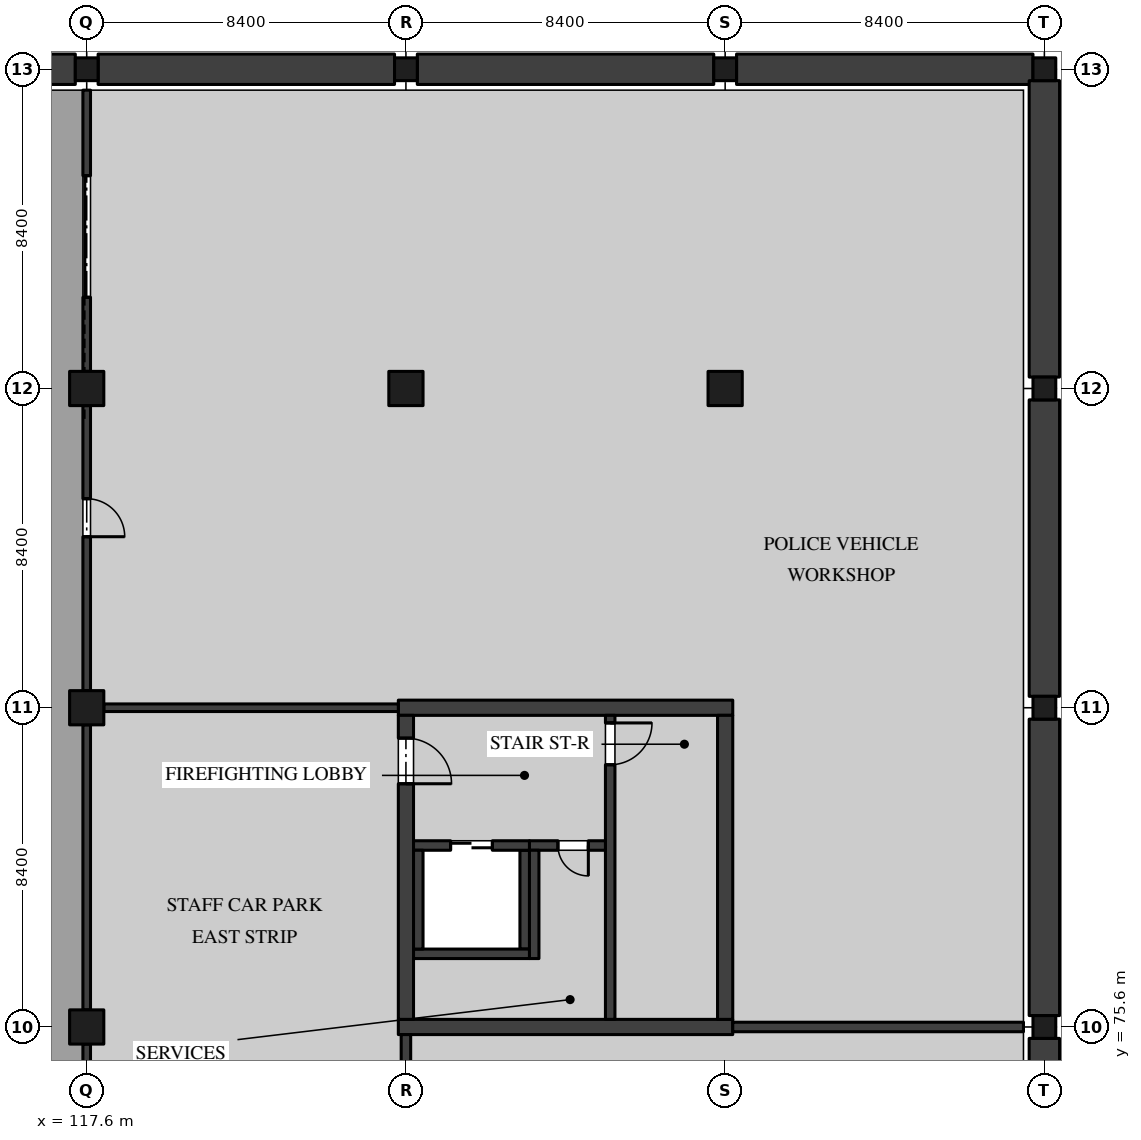
"""IFC4 building model, lengths in metres.
Left out: names, types, materials, properties, quantities, classifications, styles, units other than length and angle.
Written with IfcOpenShell. Run it as: python <this file> out.ifc"""

import sys

from ifc_helpers import new_model, si_unit, direction, frame, frame_2d, origin, origin_2d, place, context, subcontext, project, spatial, rectangle, extrude, element, fill, save


model = new_model("IFC4")
c1 = context("Model", 3, precision=1e-05, world=origin(), true_north=direction((0.0, 1.0)))
c2 = subcontext(c1, "Body", "Model", "MODEL_VIEW")
j1 = project(units=[si_unit("LENGTHUNIT", "METRE"), si_unit("PLANEANGLEUNIT", "RADIAN")], contexts=[c1])
p1 = place(None, origin())
s1 = spatial("IfcSite", under=j1, at=p1, CompositionType="ELEMENT")
p2 = place(p1, origin())
s2 = spatial("IfcBuilding", under=s1, at=p2, CompositionType="ELEMENT")
p3 = place(p2, frame((0.0, 0.0, -4.5)))
s3 = spatial("IfcBuildingStorey", under=s2, at=p3, CompositionType="ELEMENT", Elevation=-4.5)
for number, where, z_axis, x_axis in (
    (1, (117.6, 75.6, 0.0), (0.0, 0.0, 1.0), (1.0, 0.0, 0.0)),
    (2, (117.6, 84.0, 0.0), (0.0, 0.0, 1.0), (1.0, 0.0, 0.0)),
    (3, (117.6, 92.4, 0.0), (0.0, 0.0, 1.0), (1.0, 0.0, 0.0)),
):
    element("IfcColumn", number, at=place(p3, frame(where, z_axis=z_axis, x_axis=x_axis)), inside=s3, PredefinedType="COLUMN", context=c2, shape_type="SweptSolid", body=[
        extrude(rectangle(XDim=0.9, YDim=0.9, at=origin_2d()), origin(), (0.0, 0.0, 1.0), 4.05),
    ])
p4 = place(p3, frame((117.6, 100.8, 0.0), z_axis=(0.0, 0.0, 1.0), x_axis=(1.0, 0.0, 0.0)))
e4 = element("IfcColumn", 4, at=p4, inside=s3, PredefinedType="COLUMN", context=c2, shape_type="SweptSolid", body=[
    extrude(rectangle(XDim=0.6, YDim=0.6, at=origin_2d()), origin(), (0.0, 0.0, 1.0), 4.05),
])
p5 = place(p3, frame((126.0, 92.4, 0.0), z_axis=(0.0, 0.0, 1.0), x_axis=(1.0, 0.0, 0.0)))
e5 = element("IfcColumn", 5, at=p5, inside=s3, PredefinedType="COLUMN", context=c2, shape_type="SweptSolid", body=[
    extrude(rectangle(XDim=0.9, YDim=0.9, at=origin_2d()), origin(), (0.0, 0.0, 1.0), 4.05),
])
p6 = place(p3, frame((126.0, 100.8, 0.0), z_axis=(0.0, 0.0, 1.0), x_axis=(1.0, 0.0, 0.0)))
e6 = element("IfcColumn", 6, at=p6, inside=s3, PredefinedType="COLUMN", context=c2, shape_type="SweptSolid", body=[
    extrude(rectangle(XDim=0.6, YDim=0.6, at=origin_2d()), origin(), (0.0, 0.0, 1.0), 4.05),
])
p7 = place(p3, frame((134.4, 92.4, 0.0), z_axis=(0.0, 0.0, 1.0), x_axis=(1.0, 0.0, 0.0)))
e7 = element("IfcColumn", 7, at=p7, inside=s3, PredefinedType="COLUMN", context=c2, shape_type="SweptSolid", body=[
    extrude(rectangle(XDim=0.9, YDim=0.9, at=origin_2d()), origin(), (0.0, 0.0, 1.0), 4.05),
])
for number, where, z_axis, x_axis in (
    (8, (134.4, 100.8, 0.0), (0.0, 0.0, 1.0), (1.0, 0.0, 0.0)),
    (9, (142.8, 75.6, 0.0), (0.0, 0.0, 1.0), (1.0, 0.0, 0.0)),
    (10, (142.8, 84.0, 0.0), (0.0, 0.0, 1.0), (1.0, 0.0, 0.0)),
    (11, (142.8, 92.4, 0.0), (0.0, 0.0, 1.0), (1.0, 0.0, 0.0)),
    (12, (142.8, 100.8, 0.0), (0.0, 0.0, 1.0), (1.0, 0.0, 0.0)),
):
    element("IfcColumn", number, at=place(p3, frame(where, z_axis=z_axis, x_axis=x_axis)), inside=s3, PredefinedType="COLUMN", context=c2, shape_type="SweptSolid", body=[
        extrude(rectangle(XDim=0.6, YDim=0.6, at=origin_2d()), origin(), (0.0, 0.0, 1.0), 4.05),
    ])
for number, where, z_axis, x_axis in (
    (13, (109.5, 100.8, 0.0), (0.0, 0.0, 1.0), (1.0, 0.0, 0.0)),
    (14, (117.9, 100.8, 0.0), (0.0, 0.0, 1.0), (1.0, 0.0, 0.0)),
    (15, (126.3, 100.8, 0.0), (0.0, 0.0, 1.0), (1.0, 0.0, 0.0)),
    (16, (134.7, 100.8, 0.0), (0.0, 0.0, 1.0), (1.0, 0.0, 0.0)),
    (17, (142.8, 67.5, 0.0), (0.0, 0.0, 1.0), (0.0, 1.0, 0.0)),
    (18, (142.8, 75.9, 0.0), (0.0, 0.0, 1.0), (0.0, 1.0, 0.0)),
    (19, (142.8, 84.3, 0.0), (0.0, 0.0, 1.0), (0.0, 1.0, 0.0)),
    (20, (142.8, 92.7, 0.0), (0.0, 0.0, 1.0), (0.0, 1.0, 0.0)),
):
    element("IfcWall", number, at=place(p3, frame(where, z_axis=z_axis, x_axis=x_axis)), inside=s3, PredefinedType="SOLIDWALL", context=c2, shape_type="SweptSolid", body=[
        extrude(rectangle(XDim=7.8, YDim=0.8, at=frame_2d((3.9, 0.0))), origin(), (0.0, 0.0, 1.0), 4.05),
    ])
for number, where, z_axis, x_axis in (
    (21, (125.8, 75.6, 0.0), (0.0, 0.0, 1.0), (1.0, 0.0, 0.0)),
    (22, (125.8, 84.0, 0.0), (0.0, 0.0, 1.0), (1.0, 0.0, 0.0)),
):
    element("IfcWall", number, at=place(p3, frame(where, z_axis=z_axis, x_axis=x_axis)), inside=s3, PredefinedType="SHEAR", context=c2, shape_type="SweptSolid", body=[
        extrude(rectangle(XDim=8.8, YDim=0.4, at=frame_2d((4.4, 0.0))), origin(), (0.0, 0.0, 1.0), 4.05),
    ])
p8 = place(p3, frame((126.0, 75.8, 0.0), z_axis=(0.0, 0.0, 1.0), x_axis=(0.0, 1.0, 0.0)))
e23 = element("IfcWall", 23, at=p8, inside=s3, PredefinedType="SHEAR", context=c2, shape_type="SweptSolid", body=[
    extrude(rectangle(XDim=8.0, YDim=0.4, at=frame_2d((4.0, 0.0))), origin(), (0.0, 0.0, 1.0), 4.05),
])
p9 = place(p8, frame((6.2, 0.0, 0.0)))
e24 = element("IfcOpeningElement", 24, at=p9, cuts=e23, PredefinedType="OPENING", context=c2, shape_type="SweptSolid", body=[
    extrude(rectangle(XDim=1.2, YDim=2.1, at=frame_2d((0.6, 1.05))), frame((0.0, 0.21, 0.0), z_axis=(0.0, -1.0, 0.0), x_axis=(1.0, 0.0, 0.0)), (0.0, 0.0, 1.0), 0.42),
])
p10 = place(p3, frame((134.4, 75.8, 0.0), z_axis=(0.0, 0.0, 1.0), x_axis=(0.0, 1.0, 0.0)))
e25 = element("IfcWall", 25, at=p10, inside=s3, PredefinedType="SHEAR", context=c2, shape_type="SweptSolid", body=[
    extrude(rectangle(XDim=8.0, YDim=0.4, at=frame_2d((4.0, 0.0))), origin(), (0.0, 0.0, 1.0), 4.05),
])
p11 = place(p3, frame((131.375, 83.8, 0.0), z_axis=(0.0, 0.0, 1.0), x_axis=(0.0, -1.0, 0.0)))
e26 = element("IfcWall", 26, at=p11, inside=s3, PredefinedType="SOLIDWALL", context=c2, shape_type="SweptSolid", body=[
    extrude(rectangle(XDim=8.0, YDim=0.25, at=frame_2d((4.0, 0.0))), origin(), (0.0, 0.0, 1.0), 4.05),
])
p12 = place(p11, frame((0.2, 0.0, 0.0)))
e27 = element("IfcOpeningElement", 27, at=p12, cuts=e26, PredefinedType="OPENING", context=c2, shape_type="SweptSolid", body=[
    extrude(rectangle(XDim=1.1, YDim=2.1, at=frame_2d((0.55, 1.05))), frame((0.0, 0.135, 0.0), z_axis=(0.0, -1.0, 0.0), x_axis=(1.0, 0.0, 0.0)), (0.0, 0.0, 1.0), 0.27),
])
p13 = place(p3, frame((131.25, 80.375, 0.0), z_axis=(0.0, 0.0, 1.0), x_axis=(-1.0, 0.0, 0.0)))
e28 = element("IfcWall", 28, at=p13, inside=s3, PredefinedType="SOLIDWALL", context=c2, shape_type="SweptSolid", body=[
    extrude(rectangle(XDim=2.0, YDim=0.25, at=frame_2d((1.0, 0.0))), origin(), (0.0, 0.0, 1.0), 4.05),
])
p14 = place(p13, frame((0.45, 0.0, 0.0)))
e29 = element("IfcOpeningElement", 29, at=p14, cuts=e28, PredefinedType="OPENING", context=c2, shape_type="SweptSolid", body=[
    extrude(rectangle(XDim=0.8, YDim=2.1, at=frame_2d((0.4, 1.05))), frame((0.0, 0.135, 0.0), z_axis=(0.0, -1.0, 0.0), x_axis=(1.0, 0.0, 0.0)), (0.0, 0.0, 1.0), 0.27),
])
p15 = place(p3, frame((129.375, 80.25, 0.0), z_axis=(0.0, 0.0, 1.0), x_axis=(0.0, -1.0, 0.0)))
e30 = element("IfcWall", 30, at=p15, inside=s3, PredefinedType="SOLIDWALL", context=c2, shape_type="SweptSolid", body=[
    extrude(rectangle(XDim=2.85, YDim=0.25, at=frame_2d((1.425, 0.0))), origin(), (0.0, 0.0, 1.0), 4.05),
])
p16 = place(p3, frame((129.125, 77.65, 0.0), z_axis=(0.0, 0.0, 1.0), x_axis=(0.0, 1.0, 0.0)))
e31 = element("IfcWall", 31, at=p16, inside=s3, PredefinedType="SOLIDWALL", context=c2, shape_type="SweptSolid", body=[
    extrude(rectangle(XDim=2.6, YDim=0.25, at=frame_2d((1.3, 0.0))), origin(), (0.0, 0.0, 1.0), 4.05),
])
p17 = place(p3, frame((126.2, 80.375, 0.0), z_axis=(0.0, 0.0, 1.0), x_axis=(1.0, 0.0, 0.0)))
e32 = element("IfcWall", 32, at=p17, inside=s3, PredefinedType="SOLIDWALL", context=c2, shape_type="SweptSolid", body=[
    extrude(rectangle(XDim=3.05, YDim=0.25, at=frame_2d((1.525, 0.0))), origin(), (0.0, 0.0, 1.0), 4.05),
])
p18 = place(p17, frame((0.975, 0.0, 0.0)))
e33 = element("IfcOpeningElement", 33, at=p18, cuts=e32, PredefinedType="OPENING", context=c2, shape_type="SweptSolid", body=[
    extrude(rectangle(XDim=1.1, YDim=2.1, at=frame_2d((0.55, 1.05))), frame((0.0, 0.135, 0.0), z_axis=(0.0, -1.0, 0.0), x_axis=(1.0, 0.0, 0.0)), (0.0, 0.0, 1.0), 0.27),
])
p19 = place(p3, frame((126.2, 77.525, 0.0), z_axis=(0.0, 0.0, 1.0), x_axis=(1.0, 0.0, 0.0)))
e34 = element("IfcWall", 34, at=p19, inside=s3, PredefinedType="SOLIDWALL", context=c2, shape_type="SweptSolid", body=[
    extrude(rectangle(XDim=3.05, YDim=0.25, at=frame_2d((1.525, 0.0))), origin(), (0.0, 0.0, 1.0), 4.05),
])
p20 = place(p3, frame((126.325, 77.65, 0.0), z_axis=(0.0, 0.0, 1.0), x_axis=(0.0, 1.0, 0.0)))
e35 = element("IfcWall", 35, at=p20, inside=s3, PredefinedType="SOLIDWALL", context=c2, shape_type="SweptSolid", body=[
    extrude(rectangle(XDim=2.6, YDim=0.25, at=frame_2d((1.3, 0.0))), origin(), (0.0, 0.0, 1.0), 4.05),
])
p21 = place(p3, frame((134.6, 75.6, 0.0), z_axis=(0.0, 0.0, 1.0), x_axis=(1.0, 0.0, 0.0)))
e36 = element("IfcWall", 36, at=p21, inside=s3, PredefinedType="PARTITIONING", context=c2, shape_type="SweptSolid", body=[
    extrude(rectangle(XDim=7.65, YDim=0.25, at=frame_2d((3.825, 0.0))), origin(), (0.0, 0.0, 1.0), 4.05),
])
p22 = place(p3, frame((126.0, 67.65, 0.0), z_axis=(0.0, 0.0, 1.0), x_axis=(0.0, 1.0, 0.0)))
e37 = element("IfcWall", 37, at=p22, inside=s3, PredefinedType="PARTITIONING", context=c2, shape_type="SweptSolid", body=[
    extrude(rectangle(XDim=7.75, YDim=0.25, at=frame_2d((3.875, 0.0))), origin(), (0.0, 0.0, 1.0), 4.05),
])
p23 = place(p3, frame((117.6, 84.45, 0.0), z_axis=(0.0, 0.0, 1.0), x_axis=(0.0, 1.0, 0.0)))
e38 = element("IfcWall", 38, at=p23, inside=s3, PredefinedType="PARTITIONING", context=c2, shape_type="SweptSolid", body=[
    extrude(rectangle(XDim=7.5, YDim=0.2, at=frame_2d((3.75, 0.0))), origin(), (0.0, 0.0, 1.0), 4.05),
])
p24 = place(p23, frame((4.05, 0.0, 0.0)))
e39 = element("IfcOpeningElement", 39, at=p24, cuts=e38, PredefinedType="OPENING", context=c2, shape_type="SweptSolid", body=[
    extrude(rectangle(XDim=1.0, YDim=2.1, at=frame_2d((0.5, 1.05))), frame((0.0, 0.11, 0.0), z_axis=(0.0, -1.0, 0.0), x_axis=(1.0, 0.0, 0.0)), (0.0, 0.0, 1.0), 0.22),
])
p25 = place(p3, frame((117.6, 92.85, 0.0), z_axis=(0.0, 0.0, 1.0), x_axis=(0.0, 1.0, 0.0)))
e40 = element("IfcWall", 40, at=p25, inside=s3, PredefinedType="PARTITIONING", context=c2, shape_type="SweptSolid", body=[
    extrude(rectangle(XDim=7.4, YDim=0.2, at=frame_2d((3.7, 0.0))), origin(), (0.0, 0.0, 1.0), 4.05),
])
p26 = place(p25, frame((1.95, 0.0, 0.0)))
e41 = element("IfcOpeningElement", 41, at=p26, cuts=e40, PredefinedType="OPENING", context=c2, shape_type="SweptSolid", body=[
    extrude(rectangle(XDim=3.2, YDim=3.0, at=frame_2d((1.6, 1.5))), frame((0.0, 0.11, 0.0), z_axis=(0.0, -1.0, 0.0), x_axis=(1.0, 0.0, 0.0)), (0.0, 0.0, 1.0), 0.22),
])
p27 = place(p3, frame((118.05, 84.0, 0.0), z_axis=(0.0, 0.0, 1.0), x_axis=(1.0, 0.0, 0.0)))
e42 = element("IfcWall", 42, at=p27, inside=s3, PredefinedType="PARTITIONING", context=c2, shape_type="SweptSolid", body=[
    extrude(rectangle(XDim=7.75, YDim=0.2, at=frame_2d((3.875, 0.0))), origin(), (0.0, 0.0, 1.0), 4.05),
])
p28 = place(p3, frame((117.6, 67.4, 0.0), z_axis=(0.0, 0.0, 1.0), x_axis=(0.0, 1.0, 0.0)))
e43 = element("IfcWall", 43, at=p28, inside=s3, PredefinedType="PARTITIONING", context=c2, shape_type="SweptSolid", body=[
    extrude(rectangle(XDim=7.75, YDim=0.2, at=frame_2d((3.875, 0.0))), origin(), (0.0, 0.0, 1.0), 4.05),
])
p29 = place(p28, frame((3.1, 0.0, 0.0)))
e44 = element("IfcOpeningElement", 44, at=p29, cuts=e43, PredefinedType="OPENING", context=c2, shape_type="SweptSolid", body=[
    extrude(rectangle(XDim=1.0, YDim=2.1, at=frame_2d((0.5, 1.05))), frame((0.0, 0.11, 0.0), z_axis=(0.0, -1.0, 0.0), x_axis=(1.0, 0.0, 0.0)), (0.0, 0.0, 1.0), 0.22),
])
p30 = place(p3, frame((117.6, 76.05, 0.0), z_axis=(0.0, 0.0, 1.0), x_axis=(0.0, 1.0, 0.0)))
e45 = element("IfcWall", 45, at=p30, inside=s3, PredefinedType="PARTITIONING", context=c2, shape_type="SweptSolid", body=[
    extrude(rectangle(XDim=7.5, YDim=0.2, at=frame_2d((3.75, 0.0))), origin(), (0.0, 0.0, 1.0), 4.05),
])
p31 = place(p9, frame((1.2, 0.0, 0.0), z_axis=(0.0, 0.0, 1.0), x_axis=(-1.0, 0.0, 0.0)))
e46 = element("IfcDoor", 46, at=p31, inside=s3, OperationType="SINGLE_SWING_LEFT", PredefinedType="DOOR", context=c2, shape_type="SweptSolid", body=[
    extrude(rectangle(XDim=1.2, YDim=2.1, at=frame_2d((0.6, 1.05))), frame((0.0, 0.035, 0.0), z_axis=(0.0, -1.0, 0.0), x_axis=(1.0, 0.0, 0.0)), (0.0, 0.0, 1.0), 0.07),
])
fill(e24, e46)
p32 = place(p14, origin())
e47 = element("IfcDoor", 47, at=p32, inside=s3, OperationType="SINGLE_SWING_RIGHT", PredefinedType="DOOR", context=c2, shape_type="SweptSolid", body=[
    extrude(rectangle(XDim=0.8, YDim=2.1, at=frame_2d((0.4, 1.05))), frame((0.0, 0.035, 0.0), z_axis=(0.0, -1.0, 0.0), x_axis=(1.0, 0.0, 0.0)), (0.0, 0.0, 1.0), 0.07),
])
fill(e29, e47)
p33 = place(p12, origin())
e48 = element("IfcDoor", 48, at=p33, inside=s3, OperationType="SINGLE_SWING_RIGHT", PredefinedType="DOOR", context=c2, shape_type="SweptSolid", body=[
    extrude(rectangle(XDim=1.1, YDim=2.1, at=frame_2d((0.55, 1.05))), frame((0.0, 0.035, 0.0), z_axis=(0.0, -1.0, 0.0), x_axis=(1.0, 0.0, 0.0)), (0.0, 0.0, 1.0), 0.07),
])
fill(e27, e48)
p34 = place(p18, origin())
e49 = element("IfcDoor", 49, at=p34, inside=s3, OperationType="DOUBLE_DOOR_SLIDING", PredefinedType="DOOR", context=c2, shape_type="SweptSolid", body=[
    extrude(rectangle(XDim=1.1, YDim=2.1, at=frame_2d((0.55, 1.05))), frame((0.0, 0.04, 0.0), z_axis=(0.0, -1.0, 0.0), x_axis=(1.0, 0.0, 0.0)), (0.0, 0.0, 1.0), 0.08),
])
fill(e33, e49)
p35 = place(p24, frame((1.0, 0.0, 0.0), z_axis=(0.0, 0.0, 1.0), x_axis=(-1.0, 0.0, 0.0)))
e50 = element("IfcDoor", 50, at=p35, inside=s3, OperationType="SINGLE_SWING_LEFT", PredefinedType="DOOR", context=c2, shape_type="SweptSolid", body=[
    extrude(rectangle(XDim=1.0, YDim=2.1, at=frame_2d((0.5, 1.05))), frame((0.0, 0.045, 0.0), z_axis=(0.0, -1.0, 0.0), x_axis=(1.0, 0.0, 0.0)), (0.0, 0.0, 1.0), 0.09),
])
fill(e39, e50)
p36 = place(p26, origin())
e51 = element("IfcDoor", 51, at=p36, inside=s3, OperationType="SLIDING_TO_LEFT", PredefinedType="GATE", context=c2, shape_type="SweptSolid", body=[
    extrude(rectangle(XDim=3.2, YDim=3.0, at=frame_2d((1.6, 1.5))), frame((0.0, 0.025, 0.0), z_axis=(0.0, -1.0, 0.0), x_axis=(1.0, 0.0, 0.0)), (0.0, 0.0, 1.0), 0.05),
])
fill(e41, e51)
save(model, sys.argv[1])
